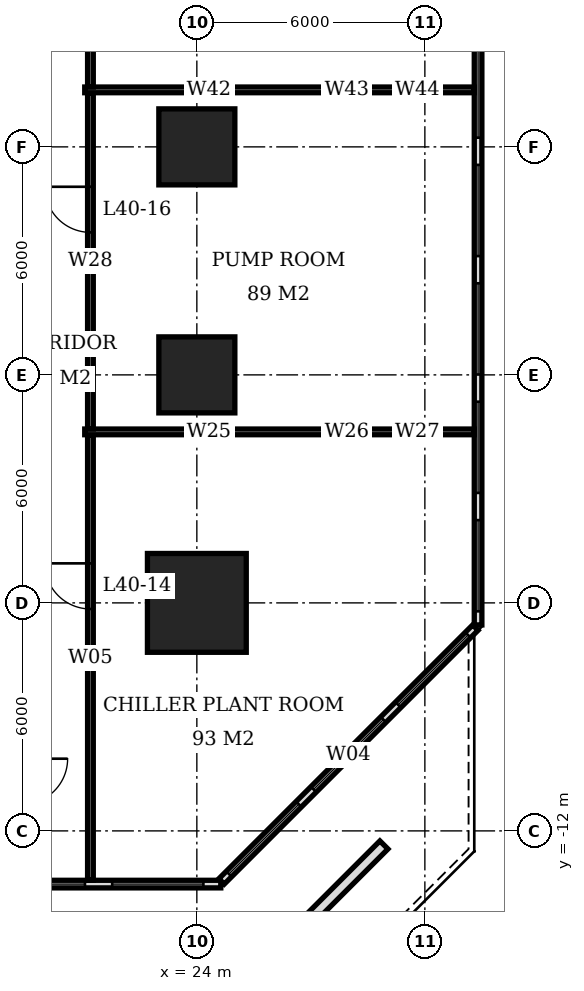
"""IFC4 building model, lengths in metres.
Left out: names, types, materials, properties, quantities, classifications, styles, units other than length and angle.
Written with IfcOpenShell. Run it as: python <this file> out.ifc"""

import sys

from ifc_helpers import new_model, si_unit, direction, frame, frame_2d, origin, origin_2d, place, context, subcontext, project, spatial, rectangle, extrude, element, fill, save


model = new_model("IFC4")
c1 = context("Model", 3, precision=1e-05, world=origin(), true_north=direction((0.0, 1.0)))
c2 = subcontext(c1, "Body", "Model", "MODEL_VIEW")
j1 = project(units=[si_unit("LENGTHUNIT", "METRE"), si_unit("PLANEANGLEUNIT", "RADIAN")], contexts=[c1])
p1 = place(None, origin())
s1 = spatial("IfcSite", under=j1, at=p1, CompositionType="ELEMENT")
p2 = place(p1, origin())
s2 = spatial("IfcBuilding", under=s1, at=p2, CompositionType="ELEMENT")
p3 = place(p2, frame((0.0, 0.0, 164.0)))
s3 = spatial("IfcBuildingStorey", under=s2, at=p3, CompositionType="ELEMENT", Elevation=164.0)
p4 = place(p3, frame((24.0, -6.0, 0.0), z_axis=(0.0, 0.0, 1.0), x_axis=(1.0, 0.0, 0.0)))
e1 = element("IfcColumn", 1, at=p4, inside=s3, PredefinedType="COLUMN", context=c2, shape_type="SweptSolid", body=[
    extrude(rectangle(XDim=2.6, YDim=2.6, at=origin_2d()), origin(), (0.0, 0.0, 1.0), 5.4),
])
for number, where, z_axis, x_axis in (
    (2, (24.0, 0.0, 0.0), (0.0, 0.0, 1.0), (1.0, 0.0, 0.0)),
    (3, (24.0, 6.0, 0.0), (0.0, 0.0, 1.0), (1.0, 0.0, 0.0)),
):
    element("IfcColumn", number, at=place(p3, frame(where, z_axis=z_axis, x_axis=x_axis)), inside=s3, PredefinedType="COLUMN", context=c2, shape_type="SweptSolid", body=[
        extrude(rectangle(XDim=2.0, YDim=2.0, at=origin_2d()), origin(), (0.0, 0.0, 1.0), 5.4),
    ])
p5 = place(p3, frame((-6.63, -13.4, 0.0), z_axis=(0.0, 0.0, 1.0), x_axis=(1.0, 0.0, 0.0)))
e4 = element("IfcWall", 4, at=p5, inside=s3, PredefinedType="USERDEFINED", context=c2, shape_type="SweptSolid", body=[
    extrude(rectangle(XDim=31.26, YDim=0.2, at=frame_2d((15.63, 0.0))), origin(), (0.0, 0.0, 1.0), 5.4),
])
p6 = place(p5, frame((0.358, 0.0, 0.6)))
e5 = element("IfcOpeningElement", 5, at=p6, cuts=e4, PredefinedType="OPENING", context=c2, shape_type="SweptSolid", body=[
    extrude(rectangle(XDim=2.4, YDim=3.0, at=frame_2d((1.2, 1.5))), frame((0.0, 0.11, 0.0), z_axis=(0.0, -1.0, 0.0), x_axis=(1.0, 0.0, 0.0)), (0.0, 0.0, 1.0), 0.22),
])
p7 = place(p5, frame((3.474, 0.0, 0.6)))
e6 = element("IfcOpeningElement", 6, at=p7, cuts=e4, PredefinedType="OPENING", context=c2, shape_type="SweptSolid", body=[
    extrude(rectangle(XDim=2.4, YDim=3.0, at=frame_2d((1.2, 1.5))), frame((0.0, 0.11, 0.0), z_axis=(0.0, -1.0, 0.0), x_axis=(1.0, 0.0, 0.0)), (0.0, 0.0, 1.0), 0.22),
])
p8 = place(p5, frame((6.59, 0.0, 0.6)))
e7 = element("IfcOpeningElement", 7, at=p8, cuts=e4, PredefinedType="OPENING", context=c2, shape_type="SweptSolid", body=[
    extrude(rectangle(XDim=2.4, YDim=3.0, at=frame_2d((1.2, 1.5))), frame((0.0, 0.11, 0.0), z_axis=(0.0, -1.0, 0.0), x_axis=(1.0, 0.0, 0.0)), (0.0, 0.0, 1.0), 0.22),
])
p9 = place(p5, frame((9.706, 0.0, 0.6)))
e8 = element("IfcOpeningElement", 8, at=p9, cuts=e4, PredefinedType="OPENING", context=c2, shape_type="SweptSolid", body=[
    extrude(rectangle(XDim=2.4, YDim=3.0, at=frame_2d((1.2, 1.5))), frame((0.0, 0.11, 0.0), z_axis=(0.0, -1.0, 0.0), x_axis=(1.0, 0.0, 0.0)), (0.0, 0.0, 1.0), 0.22),
])
p10 = place(p5, frame((13.572, 0.0, 0.0)))
e9 = element("IfcOpeningElement", 9, at=p10, cuts=e4, PredefinedType="OPENING", context=c2, shape_type="SweptSolid", body=[
    extrude(rectangle(XDim=1.0, YDim=2.1, at=frame_2d((0.5, 1.05))), frame((0.0, 0.11, 0.0), z_axis=(0.0, -1.0, 0.0), x_axis=(1.0, 0.0, 0.0)), (0.0, 0.0, 1.0), 0.22),
])
p11 = place(p5, frame((15.938, 0.0, 0.6)))
e10 = element("IfcOpeningElement", 10, at=p11, cuts=e4, PredefinedType="OPENING", context=c2, shape_type="SweptSolid", body=[
    extrude(rectangle(XDim=2.4, YDim=3.0, at=frame_2d((1.2, 1.5))), frame((0.0, 0.11, 0.0), z_axis=(0.0, -1.0, 0.0), x_axis=(1.0, 0.0, 0.0)), (0.0, 0.0, 1.0), 0.22),
])
p12 = place(p5, frame((19.054, 0.0, 0.6)))
e11 = element("IfcOpeningElement", 11, at=p12, cuts=e4, PredefinedType="OPENING", context=c2, shape_type="SweptSolid", body=[
    extrude(rectangle(XDim=2.4, YDim=3.0, at=frame_2d((1.2, 1.5))), frame((0.0, 0.11, 0.0), z_axis=(0.0, -1.0, 0.0), x_axis=(1.0, 0.0, 0.0)), (0.0, 0.0, 1.0), 0.22),
])
p13 = place(p5, frame((22.17, 0.0, 0.6)))
e12 = element("IfcOpeningElement", 12, at=p13, cuts=e4, PredefinedType="OPENING", context=c2, shape_type="SweptSolid", body=[
    extrude(rectangle(XDim=2.4, YDim=3.0, at=frame_2d((1.2, 1.5))), frame((0.0, 0.11, 0.0), z_axis=(0.0, -1.0, 0.0), x_axis=(1.0, 0.0, 0.0)), (0.0, 0.0, 1.0), 0.22),
])
p14 = place(p5, frame((25.286, 0.0, 0.6)))
e13 = element("IfcOpeningElement", 13, at=p14, cuts=e4, PredefinedType="OPENING", context=c2, shape_type="SweptSolid", body=[
    extrude(rectangle(XDim=2.4, YDim=3.0, at=frame_2d((1.2, 1.5))), frame((0.0, 0.11, 0.0), z_axis=(0.0, -1.0, 0.0), x_axis=(1.0, 0.0, 0.0)), (0.0, 0.0, 1.0), 0.22),
])
p15 = place(p5, frame((28.402, 0.0, 0.6)))
e14 = element("IfcOpeningElement", 14, at=p15, cuts=e4, PredefinedType="OPENING", context=c2, shape_type="SweptSolid", body=[
    extrude(rectangle(XDim=2.4, YDim=3.0, at=frame_2d((1.2, 1.5))), frame((0.0, 0.11, 0.0), z_axis=(0.0, -1.0, 0.0), x_axis=(1.0, 0.0, 0.0)), (0.0, 0.0, 1.0), 0.22),
])
p16 = place(p3, frame((24.651, -13.329, 0.0), z_axis=(0.0, 0.0, 1.0), x_axis=(0.707106781187, 0.707106781187, 0.0)))
e15 = element("IfcWall", 15, at=p16, inside=s3, PredefinedType="USERDEFINED", context=c2, shape_type="SweptSolid", body=[
    extrude(rectangle(XDim=9.445, YDim=0.2, at=frame_2d((4.723, 0.0))), origin(), (0.0, 0.0, 1.0), 5.4),
])
p17 = place(p16, frame((0.274, 0.0, 0.6)))
e16 = element("IfcOpeningElement", 16, at=p17, cuts=e15, PredefinedType="OPENING", context=c2, shape_type="SweptSolid", body=[
    extrude(rectangle(XDim=2.6, YDim=3.0, at=frame_2d((1.3, 1.5))), frame((0.0, 0.11, 0.0), z_axis=(0.0, -1.0, 0.0), x_axis=(1.0, 0.0, 0.0)), (0.0, 0.0, 1.0), 0.22),
])
p18 = place(p16, frame((3.423, 0.0, 0.6)))
e17 = element("IfcOpeningElement", 17, at=p18, cuts=e15, PredefinedType="OPENING", context=c2, shape_type="SweptSolid", body=[
    extrude(rectangle(XDim=2.6, YDim=3.0, at=frame_2d((1.3, 1.5))), frame((0.0, 0.11, 0.0), z_axis=(0.0, -1.0, 0.0), x_axis=(1.0, 0.0, 0.0)), (0.0, 0.0, 1.0), 0.22),
])
p19 = place(p16, frame((6.571, 0.0, 0.6)))
e18 = element("IfcOpeningElement", 18, at=p19, cuts=e15, PredefinedType="OPENING", context=c2, shape_type="SweptSolid", body=[
    extrude(rectangle(XDim=2.6, YDim=3.0, at=frame_2d((1.3, 1.5))), frame((0.0, 0.11, 0.0), z_axis=(0.0, -1.0, 0.0), x_axis=(1.0, 0.0, 0.0)), (0.0, 0.0, 1.0), 0.22),
])
p20 = place(p3, frame((31.4, -6.58, 0.0), z_axis=(0.0, 0.0, 1.0), x_axis=(0.0, 1.0, 0.0)))
e19 = element("IfcWall", 19, at=p20, inside=s3, PredefinedType="USERDEFINED", context=c2, shape_type="SweptSolid", body=[
    extrude(rectangle(XDim=31.16, YDim=0.2, at=frame_2d((15.58, 0.0))), origin(), (0.0, 0.0, 1.0), 5.4),
])
p21 = place(p20, frame((0.358, 0.0, 0.6)))
e20 = element("IfcOpeningElement", 20, at=p21, cuts=e19, PredefinedType="OPENING", context=c2, shape_type="SweptSolid", body=[
    extrude(rectangle(XDim=2.4, YDim=3.0, at=frame_2d((1.2, 1.5))), frame((0.0, 0.11, 0.0), z_axis=(0.0, -1.0, 0.0), x_axis=(1.0, 0.0, 0.0)), (0.0, 0.0, 1.0), 0.22),
])
p22 = place(p20, frame((3.474, 0.0, 0.6)))
e21 = element("IfcOpeningElement", 21, at=p22, cuts=e19, PredefinedType="OPENING", context=c2, shape_type="SweptSolid", body=[
    extrude(rectangle(XDim=2.4, YDim=3.0, at=frame_2d((1.2, 1.5))), frame((0.0, 0.11, 0.0), z_axis=(0.0, -1.0, 0.0), x_axis=(1.0, 0.0, 0.0)), (0.0, 0.0, 1.0), 0.22),
])
p23 = place(p20, frame((6.59, 0.0, 0.6)))
e22 = element("IfcOpeningElement", 22, at=p23, cuts=e19, PredefinedType="OPENING", context=c2, shape_type="SweptSolid", body=[
    extrude(rectangle(XDim=2.4, YDim=3.0, at=frame_2d((1.2, 1.5))), frame((0.0, 0.11, 0.0), z_axis=(0.0, -1.0, 0.0), x_axis=(1.0, 0.0, 0.0)), (0.0, 0.0, 1.0), 0.22),
])
p24 = place(p20, frame((9.706, 0.0, 0.6)))
e23 = element("IfcOpeningElement", 23, at=p24, cuts=e19, PredefinedType="OPENING", context=c2, shape_type="SweptSolid", body=[
    extrude(rectangle(XDim=2.4, YDim=3.0, at=frame_2d((1.2, 1.5))), frame((0.0, 0.11, 0.0), z_axis=(0.0, -1.0, 0.0), x_axis=(1.0, 0.0, 0.0)), (0.0, 0.0, 1.0), 0.22),
])
p25 = place(p20, frame((12.822, 0.0, 0.6)))
e24 = element("IfcOpeningElement", 24, at=p25, cuts=e19, PredefinedType="OPENING", context=c2, shape_type="SweptSolid", body=[
    extrude(rectangle(XDim=2.4, YDim=3.0, at=frame_2d((1.2, 1.5))), frame((0.0, 0.11, 0.0), z_axis=(0.0, -1.0, 0.0), x_axis=(1.0, 0.0, 0.0)), (0.0, 0.0, 1.0), 0.22),
])
p26 = place(p20, frame((15.938, 0.0, 0.6)))
e25 = element("IfcOpeningElement", 25, at=p26, cuts=e19, PredefinedType="OPENING", context=c2, shape_type="SweptSolid", body=[
    extrude(rectangle(XDim=2.4, YDim=3.0, at=frame_2d((1.2, 1.5))), frame((0.0, 0.11, 0.0), z_axis=(0.0, -1.0, 0.0), x_axis=(1.0, 0.0, 0.0)), (0.0, 0.0, 1.0), 0.22),
])
p27 = place(p20, frame((19.054, 0.0, 0.6)))
e26 = element("IfcOpeningElement", 26, at=p27, cuts=e19, PredefinedType="OPENING", context=c2, shape_type="SweptSolid", body=[
    extrude(rectangle(XDim=2.4, YDim=3.0, at=frame_2d((1.2, 1.5))), frame((0.0, 0.11, 0.0), z_axis=(0.0, -1.0, 0.0), x_axis=(1.0, 0.0, 0.0)), (0.0, 0.0, 1.0), 0.22),
])
p28 = place(p20, frame((22.17, 0.0, 0.6)))
e27 = element("IfcOpeningElement", 27, at=p28, cuts=e19, PredefinedType="OPENING", context=c2, shape_type="SweptSolid", body=[
    extrude(rectangle(XDim=2.4, YDim=3.0, at=frame_2d((1.2, 1.5))), frame((0.0, 0.11, 0.0), z_axis=(0.0, -1.0, 0.0), x_axis=(1.0, 0.0, 0.0)), (0.0, 0.0, 1.0), 0.22),
])
p29 = place(p20, frame((25.286, 0.0, 0.6)))
e28 = element("IfcOpeningElement", 28, at=p29, cuts=e19, PredefinedType="OPENING", context=c2, shape_type="SweptSolid", body=[
    extrude(rectangle(XDim=2.4, YDim=3.0, at=frame_2d((1.2, 1.5))), frame((0.0, 0.11, 0.0), z_axis=(0.0, -1.0, 0.0), x_axis=(1.0, 0.0, 0.0)), (0.0, 0.0, 1.0), 0.22),
])
p30 = place(p20, frame((28.402, 0.0, 0.6)))
e29 = element("IfcOpeningElement", 29, at=p30, cuts=e19, PredefinedType="OPENING", context=c2, shape_type="SweptSolid", body=[
    extrude(rectangle(XDim=2.4, YDim=3.0, at=frame_2d((1.2, 1.5))), frame((0.0, 0.11, 0.0), z_axis=(0.0, -1.0, 0.0), x_axis=(1.0, 0.0, 0.0)), (0.0, 0.0, 1.0), 0.22),
])
p31 = place(p3, frame((28.923, -12.37, 0.0), z_axis=(0.0, 0.0, 1.0), x_axis=(-0.707106781187, -0.707106781187, 0.0)))
e30 = element("IfcWall", 30, at=p31, inside=s3, PredefinedType="USERDEFINED", context=c2, shape_type="SweptSolid", body=[
    extrude(rectangle(XDim=6.438, YDim=0.3, at=frame_2d((3.219, 0.0))), origin(), (0.0, 0.0, 1.0), 0.6),
])
p32 = place(p3, frame((21.2, -13.3, 0.0), z_axis=(0.0, 0.0, 1.0), x_axis=(0.0, 1.0, 0.0)))
e31 = element("IfcWall", 31, at=p32, inside=s3, PredefinedType="PARTITIONING", context=c2, shape_type="SweptSolid", body=[
    extrude(rectangle(XDim=11.725, YDim=0.15, at=frame_2d((5.863, 0.0))), origin(), (0.0, 0.0, 1.0), 5.15),
])
p33 = place(p32, frame((7.14, 0.0, 0.0)))
e32 = element("IfcOpeningElement", 32, at=p33, cuts=e31, PredefinedType="OPENING", context=c2, shape_type="SweptSolid", body=[
    extrude(rectangle(XDim=1.2, YDim=2.4, at=frame_2d((0.6, 1.2))), frame((0.0, 0.085, 0.0), z_axis=(0.0, -1.0, 0.0), x_axis=(1.0, 0.0, 0.0)), (0.0, 0.0, 1.0), 0.17),
])
p34 = place(p3, frame((21.2, -1.425, 0.0), z_axis=(0.0, 0.0, 1.0), x_axis=(0.0, 1.0, 0.0)))
e33 = element("IfcWall", 33, at=p34, inside=s3, PredefinedType="PARTITIONING", context=c2, shape_type="SweptSolid", body=[
    extrude(rectangle(XDim=8.85, YDim=0.15, at=frame_2d((4.425, 0.0))), origin(), (0.0, 0.0, 1.0), 5.15),
])
p35 = place(p34, frame((5.175, 0.0, 0.0)))
e34 = element("IfcOpeningElement", 34, at=p35, cuts=e33, PredefinedType="OPENING", context=c2, shape_type="SweptSolid", body=[
    extrude(rectangle(XDim=1.2, YDim=2.4, at=frame_2d((0.6, 1.2))), frame((0.0, 0.085, 0.0), z_axis=(0.0, -1.0, 0.0), x_axis=(1.0, 0.0, 0.0)), (0.0, 0.0, 1.0), 0.17),
])
p36 = place(p3, frame((21.05, -1.5, 0.0), z_axis=(0.0, 0.0, 1.0), x_axis=(1.0, 0.0, 0.0)))
e35 = element("IfcWall", 35, at=p36, inside=s3, PredefinedType="PARTITIONING", context=c2, shape_type="SweptSolid", body=[
    extrude(rectangle(XDim=6.54, YDim=0.15, at=frame_2d((3.27, 0.0))), origin(), (0.0, 0.0, 1.0), 5.15),
])
p37 = place(p3, frame((27.59, -1.5, 0.0), z_axis=(0.0, 0.0, 1.0), x_axis=(1.0, 0.0, 0.0)))
e36 = element("IfcWall", 36, at=p37, inside=s3, PredefinedType="PARTITIONING", context=c2, shape_type="SweptSolid", body=[
    extrude(rectangle(XDim=0.72, YDim=0.15, at=frame_2d((0.36, 0.0))), origin(), (0.0, 0.0, 1.0), 4.15),
])
p38 = place(p3, frame((28.31, -1.5, 0.0), z_axis=(0.0, 0.0, 1.0), x_axis=(1.0, 0.0, 0.0)))
e37 = element("IfcWall", 37, at=p38, inside=s3, PredefinedType="PARTITIONING", context=c2, shape_type="SweptSolid", body=[
    extrude(rectangle(XDim=2.99, YDim=0.15, at=frame_2d((1.495, 0.0))), origin(), (0.0, 0.0, 1.0), 5.15),
])
p39 = place(p3, frame((21.2, 7.575, 0.0), z_axis=(0.0, 0.0, 1.0), x_axis=(0.0, 1.0, 0.0)))
e38 = element("IfcWall", 38, at=p39, inside=s3, PredefinedType="PARTITIONING", context=c2, shape_type="SweptSolid", body=[
    extrude(rectangle(XDim=11.85, YDim=0.15, at=frame_2d((5.925, 0.0))), origin(), (0.0, 0.0, 1.0), 5.15),
])
p40 = place(p39, frame((7.125, 0.0, 0.0)))
e39 = element("IfcOpeningElement", 39, at=p40, cuts=e38, PredefinedType="OPENING", context=c2, shape_type="SweptSolid", body=[
    extrude(rectangle(XDim=1.2, YDim=2.4, at=frame_2d((0.6, 1.2))), frame((0.0, 0.085, 0.0), z_axis=(0.0, -1.0, 0.0), x_axis=(1.0, 0.0, 0.0)), (0.0, 0.0, 1.0), 0.17),
])
p41 = place(p3, frame((21.05, 7.5, 0.0), z_axis=(0.0, 0.0, 1.0), x_axis=(1.0, 0.0, 0.0)))
e40 = element("IfcWall", 40, at=p41, inside=s3, PredefinedType="PARTITIONING", context=c2, shape_type="SweptSolid", body=[
    extrude(rectangle(XDim=6.54, YDim=0.15, at=frame_2d((3.27, 0.0))), origin(), (0.0, 0.0, 1.0), 5.15),
])
p42 = place(p3, frame((27.59, 7.5, 0.0), z_axis=(0.0, 0.0, 1.0), x_axis=(1.0, 0.0, 0.0)))
e41 = element("IfcWall", 41, at=p42, inside=s3, PredefinedType="PARTITIONING", context=c2, shape_type="SweptSolid", body=[
    extrude(rectangle(XDim=0.72, YDim=0.15, at=frame_2d((0.36, 0.0))), origin(), (0.0, 0.0, 1.0), 4.15),
])
p43 = place(p3, frame((28.31, 7.5, 0.0), z_axis=(0.0, 0.0, 1.0), x_axis=(1.0, 0.0, 0.0)))
e42 = element("IfcWall", 42, at=p43, inside=s3, PredefinedType="PARTITIONING", context=c2, shape_type="SweptSolid", body=[
    extrude(rectangle(XDim=2.99, YDim=0.15, at=frame_2d((1.495, 0.0))), origin(), (0.0, 0.0, 1.0), 5.15),
])
p44 = place(p14, origin())
e43 = element("IfcWindow", 43, at=p44, inside=s3, PartitioningType="SINGLE_PANEL", PredefinedType="USERDEFINED", context=c2, shape_type="SweptSolid", body=[
    extrude(rectangle(XDim=2.4, YDim=3.0, at=frame_2d((1.2, 1.5))), frame((0.0, 0.03, 0.0), z_axis=(0.0, -1.0, 0.0), x_axis=(1.0, 0.0, 0.0)), (0.0, 0.0, 1.0), 0.06),
])
fill(e13, e43)
p45 = place(p15, origin())
e44 = element("IfcWindow", 44, at=p45, inside=s3, PartitioningType="SINGLE_PANEL", PredefinedType="USERDEFINED", context=c2, shape_type="SweptSolid", body=[
    extrude(rectangle(XDim=2.4, YDim=3.0, at=frame_2d((1.2, 1.5))), frame((0.0, 0.03, 0.0), z_axis=(0.0, -1.0, 0.0), x_axis=(1.0, 0.0, 0.0)), (0.0, 0.0, 1.0), 0.06),
])
fill(e14, e44)
p46 = place(p17, origin())
e45 = element("IfcWindow", 45, at=p46, inside=s3, PartitioningType="SINGLE_PANEL", PredefinedType="USERDEFINED", context=c2, shape_type="SweptSolid", body=[
    extrude(rectangle(XDim=2.6, YDim=3.0, at=frame_2d((1.3, 1.5))), frame((0.0, 0.03, 0.0), z_axis=(0.0, -1.0, 0.0), x_axis=(1.0, 0.0, 0.0)), (0.0, 0.0, 1.0), 0.06),
])
fill(e16, e45)
p47 = place(p18, origin())
e46 = element("IfcWindow", 46, at=p47, inside=s3, PartitioningType="SINGLE_PANEL", PredefinedType="USERDEFINED", context=c2, shape_type="SweptSolid", body=[
    extrude(rectangle(XDim=2.6, YDim=3.0, at=frame_2d((1.3, 1.5))), frame((0.0, 0.03, 0.0), z_axis=(0.0, -1.0, 0.0), x_axis=(1.0, 0.0, 0.0)), (0.0, 0.0, 1.0), 0.06),
])
fill(e17, e46)
p48 = place(p19, origin())
e47 = element("IfcWindow", 47, at=p48, inside=s3, PartitioningType="SINGLE_PANEL", PredefinedType="USERDEFINED", context=c2, shape_type="SweptSolid", body=[
    extrude(rectangle(XDim=2.6, YDim=3.0, at=frame_2d((1.3, 1.5))), frame((0.0, 0.03, 0.0), z_axis=(0.0, -1.0, 0.0), x_axis=(1.0, 0.0, 0.0)), (0.0, 0.0, 1.0), 0.06),
])
fill(e18, e47)
p49 = place(p21, origin())
e48 = element("IfcWindow", 48, at=p49, inside=s3, PartitioningType="SINGLE_PANEL", PredefinedType="USERDEFINED", context=c2, shape_type="SweptSolid", body=[
    extrude(rectangle(XDim=2.4, YDim=3.0, at=frame_2d((1.2, 1.5))), frame((0.0, 0.03, 0.0), z_axis=(0.0, -1.0, 0.0), x_axis=(1.0, 0.0, 0.0)), (0.0, 0.0, 1.0), 0.06),
])
fill(e20, e48)
p50 = place(p22, origin())
e49 = element("IfcWindow", 49, at=p50, inside=s3, PartitioningType="SINGLE_PANEL", PredefinedType="USERDEFINED", context=c2, shape_type="SweptSolid", body=[
    extrude(rectangle(XDim=2.4, YDim=3.0, at=frame_2d((1.2, 1.5))), frame((0.0, 0.03, 0.0), z_axis=(0.0, -1.0, 0.0), x_axis=(1.0, 0.0, 0.0)), (0.0, 0.0, 1.0), 0.06),
])
fill(e21, e49)
p51 = place(p23, origin())
e50 = element("IfcWindow", 50, at=p51, inside=s3, PartitioningType="SINGLE_PANEL", PredefinedType="USERDEFINED", context=c2, shape_type="SweptSolid", body=[
    extrude(rectangle(XDim=2.4, YDim=3.0, at=frame_2d((1.2, 1.5))), frame((0.0, 0.03, 0.0), z_axis=(0.0, -1.0, 0.0), x_axis=(1.0, 0.0, 0.0)), (0.0, 0.0, 1.0), 0.06),
])
fill(e22, e50)
p52 = place(p24, origin())
e51 = element("IfcWindow", 51, at=p52, inside=s3, PartitioningType="SINGLE_PANEL", PredefinedType="USERDEFINED", context=c2, shape_type="SweptSolid", body=[
    extrude(rectangle(XDim=2.4, YDim=3.0, at=frame_2d((1.2, 1.5))), frame((0.0, 0.03, 0.0), z_axis=(0.0, -1.0, 0.0), x_axis=(1.0, 0.0, 0.0)), (0.0, 0.0, 1.0), 0.06),
])
fill(e23, e51)
p53 = place(p25, origin())
e52 = element("IfcWindow", 52, at=p53, inside=s3, PartitioningType="SINGLE_PANEL", PredefinedType="USERDEFINED", context=c2, shape_type="SweptSolid", body=[
    extrude(rectangle(XDim=2.4, YDim=3.0, at=frame_2d((1.2, 1.5))), frame((0.0, 0.03, 0.0), z_axis=(0.0, -1.0, 0.0), x_axis=(1.0, 0.0, 0.0)), (0.0, 0.0, 1.0), 0.06),
])
fill(e24, e52)
p54 = place(p33, origin())
e53 = element("IfcDoor", 53, at=p54, inside=s3, OperationType="SINGLE_SWING_RIGHT", PredefinedType="DOOR", context=c2, shape_type="SweptSolid", body=[
    extrude(rectangle(XDim=1.2, YDim=2.4, at=frame_2d((0.6, 1.2))), frame((0.0, 0.025, 0.0), z_axis=(0.0, -1.0, 0.0), x_axis=(1.0, 0.0, 0.0)), (0.0, 0.0, 1.0), 0.05),
])
fill(e32, e53)
p55 = place(p35, origin())
e54 = element("IfcDoor", 54, at=p55, inside=s3, OperationType="SINGLE_SWING_RIGHT", PredefinedType="DOOR", context=c2, shape_type="SweptSolid", body=[
    extrude(rectangle(XDim=1.2, YDim=2.4, at=frame_2d((0.6, 1.2))), frame((0.0, 0.025, 0.0), z_axis=(0.0, -1.0, 0.0), x_axis=(1.0, 0.0, 0.0)), (0.0, 0.0, 1.0), 0.05),
])
fill(e34, e54)
save(model, sys.argv[1])
